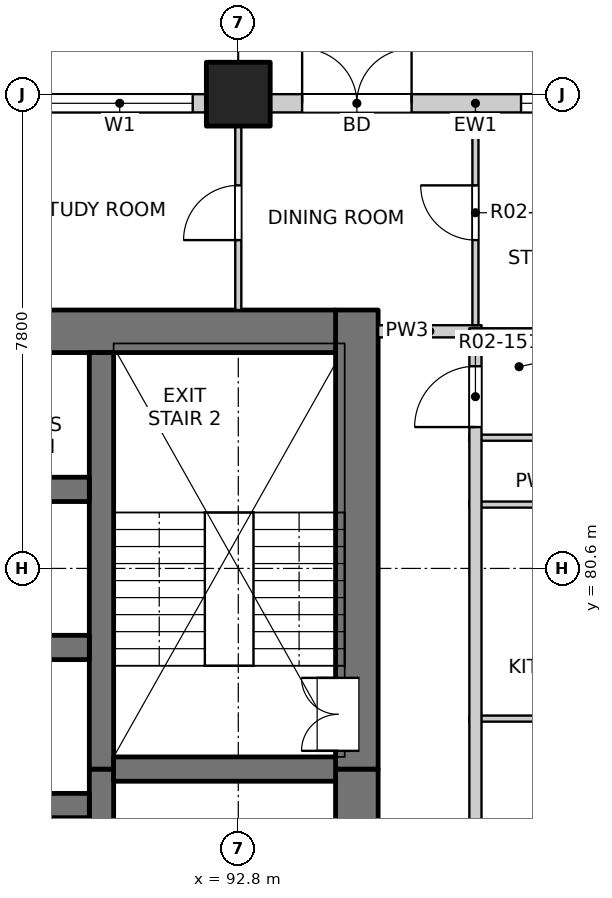
"""IFC4 building model, lengths in metres.
Left out: names, types, materials, properties, quantities, classifications, styles, units other than length and angle.
Written with IfcOpenShell. Run it as: python <this file> out.ifc"""

import sys

from ifc_helpers import new_model, si_unit, direction, frame, frame_2d, origin, origin_2d, place, context, subcontext, project, spatial, rectangle, extrude, element, fill, save


model = new_model("IFC4")
c1 = context("Model", 3, precision=1e-05, world=origin(), true_north=direction((0.0, 1.0)))
c2 = subcontext(c1, "Body", "Model", "MODEL_VIEW")
j1 = project(units=[si_unit("LENGTHUNIT", "METRE"), si_unit("PLANEANGLEUNIT", "RADIAN")], contexts=[c1])
p1 = place(None, origin())
s1 = spatial("IfcSite", under=j1, at=p1, CompositionType="ELEMENT")
p2 = place(p1, origin())
s2 = spatial("IfcBuilding", under=s1, at=p2, CompositionType="ELEMENT")
p3 = place(p2, frame((0.0, 0.0, 29.7)))
s3 = spatial("IfcBuildingStorey", under=s2, at=p3, CompositionType="ELEMENT", Elevation=29.7)
p4 = place(p3, frame((92.8, 88.4, -0.25), z_axis=(0.0, 0.0, 1.0), x_axis=(1.0, 0.0, 0.0)))
e1 = element("IfcColumn", 1, at=p4, inside=s3, PredefinedType="COLUMN", context=c2, shape_type="SweptSolid", body=[
    extrude(rectangle(XDim=1.05, YDim=1.05, at=origin_2d()), origin(), (0.0, 0.0, 1.0), 3.4),
])
p5 = place(p3, frame((94.75, 61.95, -0.25), z_axis=(0.0, 0.0, 1.0), x_axis=(0.0, 1.0, 0.0)))
e2 = element("IfcWall", 2, at=p5, inside=s3, PredefinedType="SOLIDWALL", context=c2, shape_type="SweptSolid", body=[
    extrude(rectangle(XDim=15.35, YDim=0.7, at=frame_2d((7.675, 0.0))), origin(), (0.0, 0.0, 1.0), 3.4),
])
p6 = place(p5, frame((0.925, 0.0, 0.25)))
e3 = element("IfcOpeningElement", 3, at=p6, cuts=e2, PredefinedType="OPENING", context=c2, shape_type="SweptSolid", body=[
    extrude(rectangle(XDim=0.9, YDim=2.1, at=frame_2d((0.45, 1.05))), frame((0.0, 0.36, 0.0), z_axis=(0.0, -1.0, 0.0), x_axis=(1.0, 0.0, 0.0)), (0.0, 0.0, 1.0), 0.72),
])
p7 = place(p5, frame((3.8, 0.0, 0.25)))
e4 = element("IfcOpeningElement", 4, at=p7, cuts=e2, PredefinedType="OPENING", context=c2, shape_type="SweptSolid", body=[
    extrude(rectangle(XDim=0.9, YDim=2.1, at=frame_2d((0.45, 1.05))), frame((0.0, 0.36, 0.0), z_axis=(0.0, -1.0, 0.0), x_axis=(1.0, 0.0, 0.0)), (0.0, 0.0, 1.0), 0.72),
])
p8 = place(p5, frame((6.8, 0.0, 0.25)))
e5 = element("IfcOpeningElement", 5, at=p8, cuts=e2, PredefinedType="OPENING", context=c2, shape_type="SweptSolid", body=[
    extrude(rectangle(XDim=0.9, YDim=2.1, at=frame_2d((0.45, 1.05))), frame((0.0, 0.36, 0.0), z_axis=(0.0, -1.0, 0.0), x_axis=(1.0, 0.0, 0.0)), (0.0, 0.0, 1.0), 0.72),
])
p9 = place(p5, frame((9.8, 0.0, 0.25)))
e6 = element("IfcOpeningElement", 6, at=p9, cuts=e2, PredefinedType="OPENING", context=c2, shape_type="SweptSolid", body=[
    extrude(rectangle(XDim=0.9, YDim=2.1, at=frame_2d((0.45, 1.05))), frame((0.0, 0.36, 0.0), z_axis=(0.0, -1.0, 0.0), x_axis=(1.0, 0.0, 0.0)), (0.0, 0.0, 1.0), 0.72),
])
p10 = place(p5, frame((13.1, 0.0, 0.25)))
e7 = element("IfcOpeningElement", 7, at=p10, cuts=e2, PredefinedType="OPENING", context=c2, shape_type="SweptSolid", body=[
    extrude(rectangle(XDim=0.9, YDim=2.1, at=frame_2d((0.45, 1.05))), frame((0.0, 0.36, 0.0), z_axis=(0.0, -1.0, 0.0), x_axis=(1.0, 0.0, 0.0)), (0.0, 0.0, 1.0), 0.72),
])
p11 = place(p3, frame((94.75, 77.3, -0.25), z_axis=(0.0, 0.0, 1.0), x_axis=(0.0, 1.0, 0.0)))
e8 = element("IfcWall", 8, at=p11, inside=s3, PredefinedType="SOLIDWALL", context=c2, shape_type="SweptSolid", body=[
    extrude(rectangle(XDim=7.55, YDim=0.7, at=frame_2d((3.775, 0.0))), origin(), (0.0, 0.0, 1.0), 3.4),
])
p12 = place(p11, frame((0.3, 0.0, 0.25)))
e9 = element("IfcOpeningElement", 9, at=p12, cuts=e8, PredefinedType="OPENING", context=c2, shape_type="SweptSolid", body=[
    extrude(rectangle(XDim=1.2, YDim=2.1, at=frame_2d((0.6, 1.05))), frame((0.0, 0.36, 0.0), z_axis=(0.0, -1.0, 0.0), x_axis=(1.0, 0.0, 0.0)), (0.0, 0.0, 1.0), 0.72),
])
p13 = place(p3, frame((75.6, 84.5, -0.25), z_axis=(0.0, 0.0, 1.0), x_axis=(1.0, 0.0, 0.0)))
e10 = element("IfcWall", 10, at=p13, inside=s3, PredefinedType="SOLIDWALL", context=c2, shape_type="SweptSolid", body=[
    extrude(rectangle(XDim=18.8, YDim=0.7, at=frame_2d((9.4, 0.0))), origin(), (0.0, 0.0, 1.0), 3.4),
])
p14 = place(p3, frame((90.55, 61.95, -0.25), z_axis=(0.0, 0.0, 1.0), x_axis=(0.0, 1.0, 0.0)))
e11 = element("IfcWall", 11, at=p14, inside=s3, PredefinedType="SOLIDWALL", context=c2, shape_type="SweptSolid", body=[
    extrude(rectangle(XDim=15.35, YDim=0.4, at=frame_2d((7.675, 0.0))), origin(), (0.0, 0.0, 1.0), 3.4),
])
p15 = place(p3, frame((90.55, 77.3, -0.25), z_axis=(0.0, 0.0, 1.0), x_axis=(0.0, 1.0, 0.0)))
e12 = element("IfcWall", 12, at=p15, inside=s3, PredefinedType="SOLIDWALL", context=c2, shape_type="SweptSolid", body=[
    extrude(rectangle(XDim=6.85, YDim=0.4, at=frame_2d((3.425, 0.0))), origin(), (0.0, 0.0, 1.0), 3.4),
])
for number, where, z_axis, x_axis in (
    (13, (87.35, 76.7, -0.25), (0.0, 0.0, 1.0), (1.0, 0.0, 0.0)),
    (14, (87.35, 79.3, -0.25), (0.0, 0.0, 1.0), (1.0, 0.0, 0.0)),
    (15, (87.35, 81.9, -0.25), (0.0, 0.0, 1.0), (1.0, 0.0, 0.0)),
):
    element("IfcWall", number, at=place(p3, frame(where, z_axis=z_axis, x_axis=x_axis)), inside=s3, PredefinedType="SOLIDWALL", context=c2, shape_type="SweptSolid", body=[
        extrude(rectangle(XDim=3.0, YDim=0.4, at=frame_2d((1.5, 0.0))), origin(), (0.0, 0.0, 1.0), 3.4),
    ])
p16 = place(p3, frame((90.75, 77.3, -0.25), z_axis=(0.0, 0.0, 1.0), x_axis=(1.0, 0.0, 0.0)))
e16 = element("IfcWall", 16, at=p16, inside=s3, PredefinedType="SOLIDWALL", context=c2, shape_type="SweptSolid", body=[
    extrude(rectangle(XDim=3.65, YDim=0.4, at=frame_2d((1.825, 0.0))), origin(), (0.0, 0.0, 1.0), 3.4),
])
p17 = place(p3, frame((85.525, 88.25, 0.0), z_axis=(0.0, 0.0, 1.0), x_axis=(1.0, 0.0, 0.0)))
e17 = element("IfcWall", 17, at=p17, inside=s3, PredefinedType="SOLIDWALL", context=c2, shape_type="SweptSolid", body=[
    extrude(rectangle(XDim=6.75, YDim=0.3, at=frame_2d((3.375, 0.0))), origin(), (0.0, 0.0, 1.0), 2.7),
])
p18 = place(p17, frame((0.525, 0.0, 0.0)))
e18 = element("IfcOpeningElement", 18, at=p18, cuts=e17, PredefinedType="OPENING", context=c2, shape_type="SweptSolid", body=[
    extrude(rectangle(XDim=1.8, YDim=2.4, at=frame_2d((0.9, 1.2))), frame((0.0, 0.16, 0.0), z_axis=(0.0, -1.0, 0.0), x_axis=(1.0, 0.0, 0.0)), (0.0, 0.0, 1.0), 0.32),
])
p19 = place(p17, frame((4.125, 0.0, 0.9)))
e19 = element("IfcOpeningElement", 19, at=p19, cuts=e17, PredefinedType="OPENING", context=c2, shape_type="SweptSolid", body=[
    extrude(rectangle(XDim=2.4, YDim=1.8, at=frame_2d((1.2, 0.9))), frame((0.0, 0.16, 0.0), z_axis=(0.0, -1.0, 0.0), x_axis=(1.0, 0.0, 0.0)), (0.0, 0.0, 1.0), 0.32),
])
p20 = place(p3, frame((93.325, 88.25, 0.0), z_axis=(0.0, 0.0, 1.0), x_axis=(1.0, 0.0, 0.0)))
e20 = element("IfcWall", 20, at=p20, inside=s3, PredefinedType="SOLIDWALL", context=c2, shape_type="SweptSolid", body=[
    extrude(rectangle(XDim=6.75, YDim=0.3, at=frame_2d((3.375, 0.0))), origin(), (0.0, 0.0, 1.0), 2.7),
])
p21 = place(p20, frame((0.525, 0.0, 0.0)))
e21 = element("IfcOpeningElement", 21, at=p21, cuts=e20, PredefinedType="OPENING", context=c2, shape_type="SweptSolid", body=[
    extrude(rectangle(XDim=1.8, YDim=2.4, at=frame_2d((0.9, 1.2))), frame((0.0, 0.16, 0.0), z_axis=(0.0, -1.0, 0.0), x_axis=(1.0, 0.0, 0.0)), (0.0, 0.0, 1.0), 0.32),
])
p22 = place(p20, frame((4.125, 0.0, 0.9)))
e22 = element("IfcOpeningElement", 22, at=p22, cuts=e20, PredefinedType="OPENING", context=c2, shape_type="SweptSolid", body=[
    extrude(rectangle(XDim=2.4, YDim=1.8, at=frame_2d((1.2, 0.9))), frame((0.0, 0.16, 0.0), z_axis=(0.0, -1.0, 0.0), x_axis=(1.0, 0.0, 0.0)), (0.0, 0.0, 1.0), 0.32),
])
for number, where, z_axis, x_axis in (
    (23, (96.6, 78.13, 0.0), (0.0, 0.0, 1.0), (1.0, 0.0, 0.0)),
    (24, (96.6, 81.65, 0.0), (0.0, 0.0, 1.0), (1.0, 0.0, 0.0)),
    (25, (96.6, 82.75, 0.0), (0.0, 0.0, 1.0), (1.0, 0.0, 0.0)),
):
    element("IfcWall", number, at=place(p3, frame(where, z_axis=z_axis, x_axis=x_axis)), inside=s3, PredefinedType="PARTITIONING", context=c2, shape_type="SweptSolid", body=[
        extrude(rectangle(XDim=2.22, YDim=0.1, at=frame_2d((1.11, 0.0))), origin(), (0.0, 0.0, 1.0), 3.15),
    ])
p23 = place(p3, frame((95.1, 84.5, 0.0), z_axis=(0.0, 0.0, 1.0), x_axis=(1.0, 0.0, 0.0)))
e26 = element("IfcWall", 26, at=p23, inside=s3, PredefinedType="PARTITIONING", context=c2, shape_type="SweptSolid", body=[
    extrude(rectangle(XDim=1.7, YDim=0.2, at=frame_2d((0.85, 0.0))), origin(), (0.0, 0.0, 1.0), 3.15),
])
p24 = place(p3, frame((96.6, 84.5, 0.0), z_axis=(0.0, 0.0, 1.0), x_axis=(1.0, 0.0, 0.0)))
e27 = element("IfcWall", 27, at=p24, inside=s3, PredefinedType="PARTITIONING", context=c2, shape_type="SweptSolid", body=[
    extrude(rectangle(XDim=11.5, YDim=0.1, at=frame_2d((5.75, 0.0))), origin(), (0.0, 0.0, 1.0), 3.15),
])
p25 = place(p24, frame((2.635, 0.0, 0.0)))
e28 = element("IfcOpeningElement", 28, at=p25, cuts=e27, PredefinedType="OPENING", context=c2, shape_type="SweptSolid", body=[
    extrude(rectangle(XDim=0.9, YDim=2.1, at=frame_2d((0.45, 1.05))), frame((0.0, 0.06, 0.0), z_axis=(0.0, -1.0, 0.0), x_axis=(1.0, 0.0, 0.0)), (0.0, 0.0, 1.0), 0.12),
])
p26 = place(p3, frame((92.8, 84.85, 0.0), z_axis=(0.0, 0.0, 1.0), x_axis=(0.0, 1.0, 0.0)))
e29 = element("IfcWall", 29, at=p26, inside=s3, PredefinedType="PARTITIONING", context=c2, shape_type="SweptSolid", body=[
    extrude(rectangle(XDim=3.25, YDim=0.1, at=frame_2d((1.625, 0.0))), origin(), (0.0, 0.0, 1.0), 3.15),
])
p27 = place(p26, frame((1.15, 0.0, 0.0)))
e30 = element("IfcOpeningElement", 30, at=p27, cuts=e29, PredefinedType="OPENING", context=c2, shape_type="SweptSolid", body=[
    extrude(rectangle(XDim=0.9, YDim=2.1, at=frame_2d((0.45, 1.05))), frame((0.0, 0.06, 0.0), z_axis=(0.0, -1.0, 0.0), x_axis=(1.0, 0.0, 0.0)), (0.0, 0.0, 1.0), 0.12),
])
p28 = place(p3, frame((96.7, 53.4, 0.0), z_axis=(0.0, 0.0, 1.0), x_axis=(0.0, 1.0, 0.0)))
e31 = element("IfcWall", 31, at=p28, inside=s3, PredefinedType="PARTITIONING", context=c2, shape_type="SweptSolid", body=[
    extrude(rectangle(XDim=31.0, YDim=0.2, at=frame_2d((15.5, 0.0))), origin(), (0.0, 0.0, 1.0), 3.15),
])
p29 = place(p28, frame((2.425, 0.0, 0.0)))
e32 = element("IfcOpeningElement", 32, at=p29, cuts=e31, PredefinedType="OPENING", context=c2, shape_type="SweptSolid", body=[
    extrude(rectangle(XDim=1.0, YDim=2.1, at=frame_2d((0.5, 1.05))), frame((0.0, 0.11, 0.0), z_axis=(0.0, -1.0, 0.0), x_axis=(1.0, 0.0, 0.0)), (0.0, 0.0, 1.0), 0.22),
])
p30 = place(p28, frame((13.375, 0.0, 0.0)))
e33 = element("IfcOpeningElement", 33, at=p30, cuts=e31, PredefinedType="OPENING", context=c2, shape_type="SweptSolid", body=[
    extrude(rectangle(XDim=1.0, YDim=2.1, at=frame_2d((0.5, 1.05))), frame((0.0, 0.11, 0.0), z_axis=(0.0, -1.0, 0.0), x_axis=(1.0, 0.0, 0.0)), (0.0, 0.0, 1.0), 0.22),
])
p31 = place(p28, frame((29.525, 0.0, 0.0)))
e34 = element("IfcOpeningElement", 34, at=p31, cuts=e31, PredefinedType="OPENING", context=c2, shape_type="SweptSolid", body=[
    extrude(rectangle(XDim=1.0, YDim=2.1, at=frame_2d((0.5, 1.05))), frame((0.0, 0.11, 0.0), z_axis=(0.0, -1.0, 0.0), x_axis=(1.0, 0.0, 0.0)), (0.0, 0.0, 1.0), 0.22),
])
p32 = place(p3, frame((96.7, 84.6, 0.0), z_axis=(0.0, 0.0, 1.0), x_axis=(0.0, 1.0, 0.0)))
e35 = element("IfcWall", 35, at=p32, inside=s3, PredefinedType="PARTITIONING", context=c2, shape_type="SweptSolid", body=[
    extrude(rectangle(XDim=3.5, YDim=0.1, at=frame_2d((1.75, 0.0))), origin(), (0.0, 0.0, 1.0), 3.15),
])
p33 = place(p32, frame((1.4, 0.0, 0.0)))
e36 = element("IfcOpeningElement", 36, at=p33, cuts=e35, PredefinedType="OPENING", context=c2, shape_type="SweptSolid", body=[
    extrude(rectangle(XDim=0.9, YDim=2.1, at=frame_2d((0.45, 1.05))), frame((0.0, 0.06, 0.0), z_axis=(0.0, -1.0, 0.0), x_axis=(1.0, 0.0, 0.0)), (0.0, 0.0, 1.0), 0.12),
])
p34 = place(p19, origin())
e37 = element("IfcWindow", 37, at=p34, inside=s3, PartitioningType="DOUBLE_PANEL_VERTICAL", PredefinedType="WINDOW", context=c2, shape_type="SweptSolid", body=[
    extrude(rectangle(XDim=2.4, YDim=1.8, at=frame_2d((1.2, 0.9))), frame((0.0, 0.03, 0.0), z_axis=(0.0, -1.0, 0.0), x_axis=(1.0, 0.0, 0.0)), (0.0, 0.0, 1.0), 0.06),
])
fill(e19, e37)
p35 = place(p21, origin())
e38 = element("IfcDoor", 38, at=p35, inside=s3, OperationType="DOUBLE_DOOR_SINGLE_SWING", PredefinedType="DOOR", context=c2, shape_type="SweptSolid", body=[
    extrude(rectangle(XDim=1.8, YDim=2.4, at=frame_2d((0.9, 1.2))), frame((0.0, 0.025, 0.0), z_axis=(0.0, -1.0, 0.0), x_axis=(1.0, 0.0, 0.0)), (0.0, 0.0, 1.0), 0.05),
])
fill(e21, e38)
p36 = place(p22, origin())
e39 = element("IfcWindow", 39, at=p36, inside=s3, PartitioningType="DOUBLE_PANEL_VERTICAL", PredefinedType="WINDOW", context=c2, shape_type="SweptSolid", body=[
    extrude(rectangle(XDim=2.4, YDim=1.8, at=frame_2d((1.2, 0.9))), frame((0.0, 0.03, 0.0), z_axis=(0.0, -1.0, 0.0), x_axis=(1.0, 0.0, 0.0)), (0.0, 0.0, 1.0), 0.06),
])
fill(e22, e39)
p37 = place(p12, origin())
e40 = element("IfcDoor", 40, at=p37, inside=s3, OperationType="DOUBLE_DOOR_SINGLE_SWING", PredefinedType="DOOR", context=c2, shape_type="SweptSolid", body=[
    extrude(rectangle(XDim=1.2, YDim=2.1, at=frame_2d((0.6, 1.05))), frame((0.0, 0.335, 0.0), z_axis=(0.0, -1.0, 0.0), x_axis=(1.0, 0.0, 0.0)), (0.0, 0.0, 1.0), 0.05),
])
fill(e9, e40)
p38 = place(p31, origin())
e41 = element("IfcDoor", 41, at=p38, inside=s3, OperationType="SINGLE_SWING_LEFT", PredefinedType="DOOR", context=c2, shape_type="SweptSolid", body=[
    extrude(rectangle(XDim=1.0, YDim=2.1, at=frame_2d((0.5, 1.05))), frame((0.0, 0.025, 0.0), z_axis=(0.0, -1.0, 0.0), x_axis=(1.0, 0.0, 0.0)), (0.0, 0.0, 1.0), 0.05),
])
fill(e34, e41)
p39 = place(p27, origin())
e42 = element("IfcDoor", 42, at=p39, inside=s3, OperationType="SINGLE_SWING_LEFT", PredefinedType="DOOR", context=c2, shape_type="SweptSolid", body=[
    extrude(rectangle(XDim=0.9, YDim=2.1, at=frame_2d((0.45, 1.05))), frame((0.0, 0.025, 0.0), z_axis=(0.0, -1.0, 0.0), x_axis=(1.0, 0.0, 0.0)), (0.0, 0.0, 1.0), 0.05),
])
fill(e30, e42)
p40 = place(p33, origin())
e43 = element("IfcDoor", 43, at=p40, inside=s3, OperationType="SINGLE_SWING_RIGHT", PredefinedType="DOOR", context=c2, shape_type="SweptSolid", body=[
    extrude(rectangle(XDim=0.9, YDim=2.1, at=frame_2d((0.45, 1.05))), frame((0.0, 0.025, 0.0), z_axis=(0.0, -1.0, 0.0), x_axis=(1.0, 0.0, 0.0)), (0.0, 0.0, 1.0), 0.05),
])
fill(e36, e43)
save(model, sys.argv[1])
